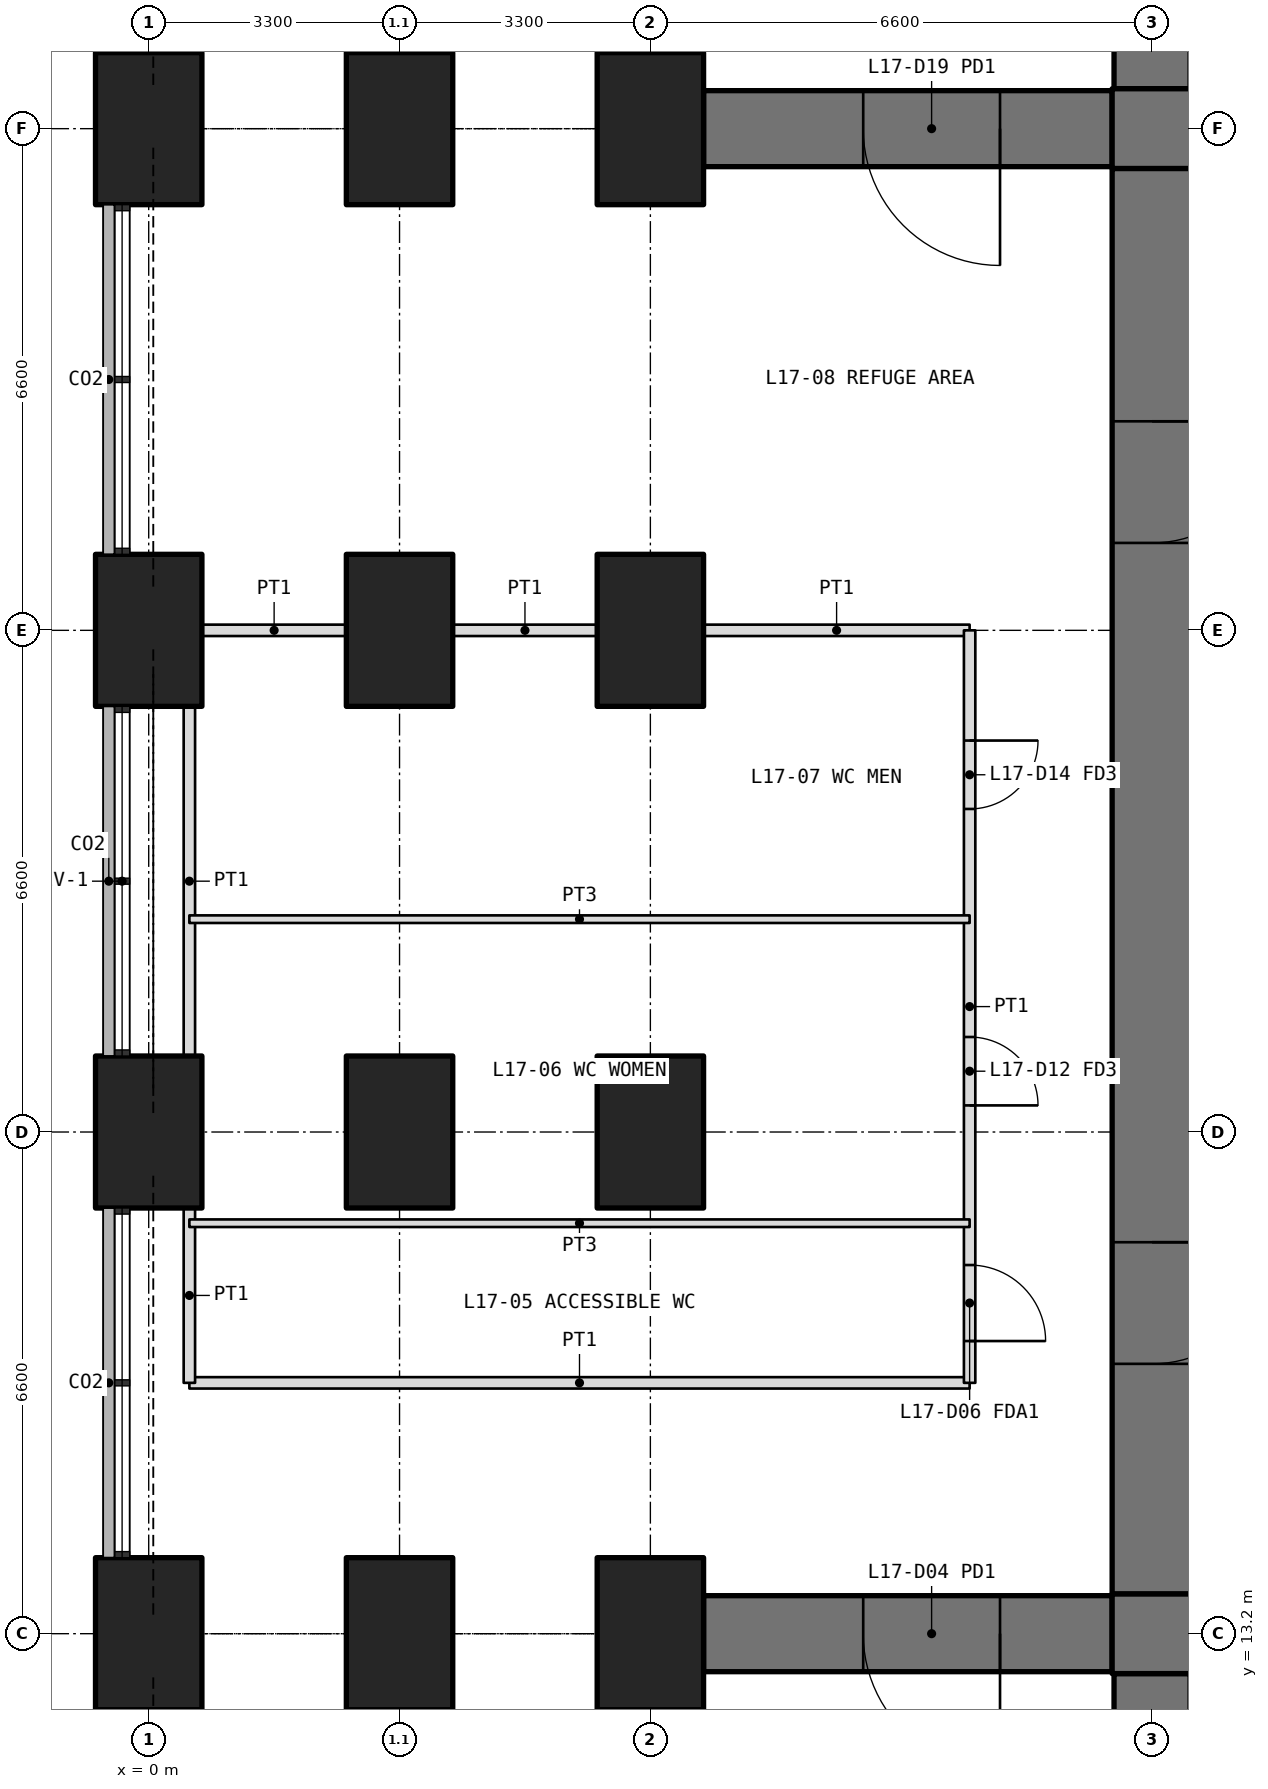
"""IFC4 building model, lengths in metres.
Left out: names, types, materials, properties, quantities, classifications, styles, units other than length and angle.
Written with IfcOpenShell. Run it as: python <this file> out.ifc"""

import sys

from ifc_helpers import new_model, si_unit, direction, frame, frame_2d, origin, origin_2d, place, context, subcontext, project, spatial, rectangle, extrude, element, fill, save


model = new_model("IFC4")
c1 = context("Model", 3, precision=1e-05, world=origin(), true_north=direction((0.0, 1.0)))
c2 = subcontext(c1, "Body", "Model", "MODEL_VIEW")
j1 = project(units=[si_unit("LENGTHUNIT", "METRE"), si_unit("PLANEANGLEUNIT", "RADIAN")], contexts=[c1])
p1 = place(None, origin())
s1 = spatial("IfcSite", under=j1, at=p1, CompositionType="ELEMENT")
p2 = place(p1, origin())
s2 = spatial("IfcBuilding", under=s1, at=p2, CompositionType="ELEMENT")
p3 = place(p2, frame((0.0, 0.0, 75.9)))
s3 = spatial("IfcBuildingStorey", under=s2, at=p3, CompositionType="ELEMENT", Elevation=75.9)
for number, where, z_axis, x_axis in (
    (1, (0.0, 13.2, 0.0), (0.0, 0.0, 1.0), (0.0, 1.0, 0.0)),
    (2, (0.0, 19.8, 0.0), (0.0, 0.0, 1.0), (0.0, 1.0, 0.0)),
    (3, (0.0, 26.4, 0.0), (0.0, 0.0, 1.0), (0.0, 1.0, 0.0)),
    (4, (0.0, 33.0, 0.0), (0.0, 0.0, 1.0), (0.0, 1.0, 0.0)),
    (5, (3.3, 13.2, 0.0), (0.0, 0.0, 1.0), (0.0, 1.0, 0.0)),
    (6, (3.3, 19.8, 0.0), (0.0, 0.0, 1.0), (0.0, 1.0, 0.0)),
    (7, (3.3, 26.4, 0.0), (0.0, 0.0, 1.0), (0.0, 1.0, 0.0)),
    (8, (3.3, 33.0, 0.0), (0.0, 0.0, 1.0), (0.0, 1.0, 0.0)),
    (9, (6.6, 13.2, 0.0), (0.0, 0.0, 1.0), (0.0, 1.0, 0.0)),
    (10, (6.6, 19.8, 0.0), (0.0, 0.0, 1.0), (0.0, 1.0, 0.0)),
    (11, (6.6, 26.4, 0.0), (0.0, 0.0, 1.0), (0.0, 1.0, 0.0)),
    (12, (6.6, 33.0, 0.0), (0.0, 0.0, 1.0), (0.0, 1.0, 0.0)),
):
    element("IfcColumn", number, at=place(p3, frame(where, z_axis=z_axis, x_axis=x_axis)), inside=s3, PredefinedType="COLUMN", context=c2, shape_type="SweptSolid", body=[
        extrude(rectangle(XDim=2.0, YDim=1.4, at=origin_2d()), origin(), (0.0, 0.0, 1.0), 6.3),
    ])
p4 = place(p3, frame((13.2, 12.675, 0.0), z_axis=(0.0, 0.0, 1.0), x_axis=(0.0, -1.0, 0.0)))
e13 = element("IfcWall", 13, at=p4, inside=s3, PredefinedType="SHEAR", context=c2, shape_type="SweptSolid", body=[
    extrude(rectangle(XDim=8.675, YDim=1.0, at=frame_2d((4.337, 0.0))), origin(), (0.0, 0.0, 1.0), 6.0),
])
p5 = place(p4, frame((1.475, 0.0, 0.0)))
e14 = element("IfcOpeningElement", 14, at=p5, cuts=e13, PredefinedType="OPENING", context=c2, shape_type="SweptSolid", body=[
    extrude(rectangle(XDim=1.8, YDim=2.4, at=frame_2d((0.9, 1.2))), frame((0.0, 0.51, 0.0), z_axis=(0.0, -1.0, 0.0), x_axis=(1.0, 0.0, 0.0)), (0.0, 0.0, 1.0), 1.02),
])
p6 = place(p3, frame((13.2, 33.525, 0.0), z_axis=(0.0, 0.0, 1.0), x_axis=(0.0, 1.0, 0.0)))
e15 = element("IfcWall", 15, at=p6, inside=s3, PredefinedType="SHEAR", context=c2, shape_type="SweptSolid", body=[
    extrude(rectangle(XDim=8.675, YDim=1.0, at=frame_2d((4.337, 0.0))), origin(), (0.0, 0.0, 1.0), 6.0),
])
p7 = place(p6, frame((1.475, 0.0, 0.0)))
e16 = element("IfcOpeningElement", 16, at=p7, cuts=e15, PredefinedType="OPENING", context=c2, shape_type="SweptSolid", body=[
    extrude(rectangle(XDim=1.8, YDim=2.4, at=frame_2d((0.9, 1.2))), frame((0.0, 0.51, 0.0), z_axis=(0.0, -1.0, 0.0), x_axis=(1.0, 0.0, 0.0)), (0.0, 0.0, 1.0), 1.02),
])
p8 = place(p3, frame((12.675, 13.2, 0.0), z_axis=(0.0, 0.0, 1.0), x_axis=(-1.0, 0.0, 0.0)))
e17 = element("IfcWall", 17, at=p8, inside=s3, PredefinedType="SHEAR", context=c2, shape_type="SweptSolid", body=[
    extrude(rectangle(XDim=5.375, YDim=1.0, at=frame_2d((2.688, 0.0))), origin(), (0.0, 0.0, 1.0), 6.0),
])
p9 = place(p8, frame((1.475, 0.0, 0.0)))
e18 = element("IfcOpeningElement", 18, at=p9, cuts=e17, PredefinedType="OPENING", context=c2, shape_type="SweptSolid", body=[
    extrude(rectangle(XDim=1.8, YDim=2.4, at=frame_2d((0.9, 1.2))), frame((0.0, 0.51, 0.0), z_axis=(0.0, -1.0, 0.0), x_axis=(1.0, 0.0, 0.0)), (0.0, 0.0, 1.0), 1.02),
])
p10 = place(p3, frame((12.675, 33.0, 0.0), z_axis=(0.0, 0.0, 1.0), x_axis=(-1.0, 0.0, 0.0)))
e19 = element("IfcWall", 19, at=p10, inside=s3, PredefinedType="SHEAR", context=c2, shape_type="SweptSolid", body=[
    extrude(rectangle(XDim=5.375, YDim=1.0, at=frame_2d((2.688, 0.0))), origin(), (0.0, 0.0, 1.0), 6.0),
])
p11 = place(p10, frame((1.475, 0.0, 0.0)))
e20 = element("IfcOpeningElement", 20, at=p11, cuts=e19, PredefinedType="OPENING", context=c2, shape_type="SweptSolid", body=[
    extrude(rectangle(XDim=1.8, YDim=2.4, at=frame_2d((0.9, 1.2))), frame((0.0, 0.51, 0.0), z_axis=(0.0, -1.0, 0.0), x_axis=(1.0, 0.0, 0.0)), (0.0, 0.0, 1.0), 1.02),
])
for number, where, z_axis, x_axis in (
    (21, (12.675, 13.2, 0.0), (0.0, 0.0, 1.0), (1.0, 0.0, 0.0)),
    (22, (40.125, 33.0, 0.0), (0.0, 0.0, 1.0), (-1.0, 0.0, 0.0)),
):
    element("IfcWall", number, at=place(p3, frame(where, z_axis=z_axis, x_axis=x_axis)), inside=s3, PredefinedType="SHEAR", context=c2, shape_type="SweptSolid", body=[
        extrude(rectangle(XDim=27.45, YDim=1.05, at=frame_2d((13.725, 0.0))), origin(), (0.0, 0.0, 1.0), 6.3),
    ])
p12 = place(p3, frame((13.2, 32.475, 0.0), z_axis=(0.0, 0.0, 1.0), x_axis=(0.0, -1.0, 0.0)))
e23 = element("IfcWall", 23, at=p12, inside=s3, PredefinedType="SHEAR", context=c2, shape_type="SweptSolid", body=[
    extrude(rectangle(XDim=18.75, YDim=1.05, at=frame_2d((9.375, 0.0))), origin(), (0.0, 0.0, 1.0), 6.3),
])
p13 = place(p12, frame((14.125, 0.0, 0.0)))
e24 = element("IfcOpeningElement", 24, at=p13, cuts=e23, PredefinedType="OPENING", context=c2, shape_type="SweptSolid", body=[
    extrude(rectangle(XDim=1.6, YDim=2.1, at=frame_2d((0.8, 1.05))), frame((0.0, 0.535, 0.0), z_axis=(0.0, -1.0, 0.0), x_axis=(1.0, 0.0, 0.0)), (0.0, 0.0, 1.0), 1.07),
])
p14 = place(p12, frame((3.325, 0.0, 0.0)))
e25 = element("IfcOpeningElement", 25, at=p14, cuts=e23, PredefinedType="OPENING", context=c2, shape_type="SweptSolid", body=[
    extrude(rectangle(XDim=1.6, YDim=2.1, at=frame_2d((0.8, 1.05))), frame((0.0, 0.535, 0.0), z_axis=(0.0, -1.0, 0.0), x_axis=(1.0, 0.0, 0.0)), (0.0, 0.0, 1.0), 1.07),
])
p15 = place(p3, frame((10.8, 16.5, 0.0), z_axis=(0.0, 0.0, 1.0), x_axis=(-1.0, 0.0, 0.0)))
e26 = element("IfcWall", 26, at=p15, inside=s3, PredefinedType="PARTITIONING", context=c2, shape_type="SweptSolid", body=[
    extrude(rectangle(XDim=10.265, YDim=0.15, at=frame_2d((5.133, 0.0))), origin(), (0.0, 0.0, 1.0), 4.0),
])
p16 = place(p3, frame((0.7, 26.4, 0.0), z_axis=(0.0, 0.0, 1.0), x_axis=(1.0, 0.0, 0.0)))
e27 = element("IfcWall", 27, at=p16, inside=s3, PredefinedType="PARTITIONING", context=c2, shape_type="SweptSolid", body=[
    extrude(rectangle(XDim=1.9, YDim=0.15, at=frame_2d((0.95, 0.0))), origin(), (0.0, 0.0, 1.0), 4.0),
])
p17 = place(p3, frame((4.0, 26.4, 0.0), z_axis=(0.0, 0.0, 1.0), x_axis=(1.0, 0.0, 0.0)))
e28 = element("IfcWall", 28, at=p17, inside=s3, PredefinedType="PARTITIONING", context=c2, shape_type="SweptSolid", body=[
    extrude(rectangle(XDim=1.9, YDim=0.15, at=frame_2d((0.95, 0.0))), origin(), (0.0, 0.0, 1.0), 4.0),
])
p18 = place(p3, frame((7.3, 26.4, 0.0), z_axis=(0.0, 0.0, 1.0), x_axis=(1.0, 0.0, 0.0)))
e29 = element("IfcWall", 29, at=p18, inside=s3, PredefinedType="PARTITIONING", context=c2, shape_type="SweptSolid", body=[
    extrude(rectangle(XDim=3.5, YDim=0.15, at=frame_2d((1.75, 0.0))), origin(), (0.0, 0.0, 1.0), 4.0),
])
p19 = place(p3, frame((0.535, 16.5, 0.0), z_axis=(0.0, 0.0, 1.0), x_axis=(0.0, 1.0, 0.0)))
e30 = element("IfcWall", 30, at=p19, inside=s3, PredefinedType="PARTITIONING", context=c2, shape_type="SweptSolid", body=[
    extrude(rectangle(XDim=2.3, YDim=0.15, at=frame_2d((1.15, 0.0))), origin(), (0.0, 0.0, 1.0), 4.0),
])
p20 = place(p3, frame((0.535, 20.8, 0.0), z_axis=(0.0, 0.0, 1.0), x_axis=(0.0, 1.0, 0.0)))
e31 = element("IfcWall", 31, at=p20, inside=s3, PredefinedType="PARTITIONING", context=c2, shape_type="SweptSolid", body=[
    extrude(rectangle(XDim=4.6, YDim=0.15, at=frame_2d((2.3, 0.0))), origin(), (0.0, 0.0, 1.0), 4.0),
])
p21 = place(p3, frame((10.8, 26.4, 0.0), z_axis=(0.0, 0.0, 1.0), x_axis=(0.0, -1.0, 0.0)))
e32 = element("IfcWall", 32, at=p21, inside=s3, PredefinedType="PARTITIONING", context=c2, shape_type="SweptSolid", body=[
    extrude(rectangle(XDim=9.9, YDim=0.15, at=frame_2d((4.95, 0.0))), origin(), (0.0, 0.0, 1.0), 4.0),
])
p22 = place(p21, frame((8.35, 0.0, 0.0)))
e33 = element("IfcOpeningElement", 33, at=p22, cuts=e32, PredefinedType="OPENING", context=c2, shape_type="SweptSolid", body=[
    extrude(rectangle(XDim=1.0, YDim=2.1, at=frame_2d((0.5, 1.05))), frame((0.0, 0.085, 0.0), z_axis=(0.0, -1.0, 0.0), x_axis=(1.0, 0.0, 0.0)), (0.0, 0.0, 1.0), 0.17),
])
p23 = place(p21, frame((5.35, 0.0, 0.0)))
e34 = element("IfcOpeningElement", 34, at=p23, cuts=e32, PredefinedType="OPENING", context=c2, shape_type="SweptSolid", body=[
    extrude(rectangle(XDim=0.9, YDim=2.1, at=frame_2d((0.45, 1.05))), frame((0.0, 0.085, 0.0), z_axis=(0.0, -1.0, 0.0), x_axis=(1.0, 0.0, 0.0)), (0.0, 0.0, 1.0), 0.17),
])
p24 = place(p21, frame((1.45, 0.0, 0.0)))
e35 = element("IfcOpeningElement", 35, at=p24, cuts=e32, PredefinedType="OPENING", context=c2, shape_type="SweptSolid", body=[
    extrude(rectangle(XDim=0.9, YDim=2.1, at=frame_2d((0.45, 1.05))), frame((0.0, 0.085, 0.0), z_axis=(0.0, -1.0, 0.0), x_axis=(1.0, 0.0, 0.0)), (0.0, 0.0, 1.0), 0.17),
])
for number, where, z_axis, x_axis in (
    (36, (0.535, 18.6, 0.0), (0.0, 0.0, 1.0), (1.0, 0.0, 0.0)),
    (37, (0.535, 22.6, 0.0), (0.0, 0.0, 1.0), (1.0, 0.0, 0.0)),
):
    element("IfcWall", number, at=place(p3, frame(where, z_axis=z_axis, x_axis=x_axis)), inside=s3, PredefinedType="PARTITIONING", context=c2, shape_type="SweptSolid", body=[
        extrude(rectangle(XDim=10.265, YDim=0.1, at=frame_2d((5.133, 0.0))), origin(), (0.0, 0.0, 1.0), 4.0),
    ])
p25 = place(p22, origin())
e38 = element("IfcDoor", 38, at=p25, inside=s3, OperationType="SINGLE_SWING_RIGHT", PredefinedType="DOOR", context=c2, shape_type="SweptSolid", body=[
    extrude(rectangle(XDim=1.0, YDim=2.1, at=frame_2d((0.5, 1.05))), frame((0.0, 0.025, 0.0), z_axis=(0.0, -1.0, 0.0), x_axis=(1.0, 0.0, 0.0)), (0.0, 0.0, 1.0), 0.05),
])
fill(e33, e38)
p26 = place(p23, origin())
e39 = element("IfcDoor", 39, at=p26, inside=s3, OperationType="SINGLE_SWING_RIGHT", PredefinedType="DOOR", context=c2, shape_type="SweptSolid", body=[
    extrude(rectangle(XDim=0.9, YDim=2.1, at=frame_2d((0.45, 1.05))), frame((0.0, 0.025, 0.0), z_axis=(0.0, -1.0, 0.0), x_axis=(1.0, 0.0, 0.0)), (0.0, 0.0, 1.0), 0.05),
])
fill(e34, e39)
p27 = place(p24, origin())
e40 = element("IfcDoor", 40, at=p27, inside=s3, OperationType="SINGLE_SWING_LEFT", PredefinedType="DOOR", context=c2, shape_type="SweptSolid", body=[
    extrude(rectangle(XDim=0.9, YDim=2.1, at=frame_2d((0.45, 1.05))), frame((0.0, 0.025, 0.0), z_axis=(0.0, -1.0, 0.0), x_axis=(1.0, 0.0, 0.0)), (0.0, 0.0, 1.0), 0.05),
])
fill(e35, e40)
p28 = place(p9, origin())
e41 = element("IfcDoor", 41, at=p28, inside=s3, OperationType="DOUBLE_DOOR_SINGLE_SWING", PredefinedType="DOOR", context=c2, shape_type="SweptSolid", body=[
    extrude(rectangle(XDim=1.8, YDim=2.4, at=frame_2d((0.9, 1.2))), frame((0.0, 0.025, 0.0), z_axis=(0.0, -1.0, 0.0), x_axis=(1.0, 0.0, 0.0)), (0.0, 0.0, 1.0), 0.05),
])
fill(e18, e41)
p29 = place(p11, origin())
e42 = element("IfcDoor", 42, at=p29, inside=s3, OperationType="DOUBLE_DOOR_SINGLE_SWING", PredefinedType="DOOR", context=c2, shape_type="SweptSolid", body=[
    extrude(rectangle(XDim=1.8, YDim=2.4, at=frame_2d((0.9, 1.2))), frame((0.0, 0.025, 0.0), z_axis=(0.0, -1.0, 0.0), x_axis=(1.0, 0.0, 0.0)), (0.0, 0.0, 1.0), 0.05),
])
fill(e20, e42)
p30 = place(p13, origin())
e43 = element("IfcDoor", 43, at=p30, inside=s3, OperationType="DOUBLE_DOOR_DOUBLE_SWING", PredefinedType="DOOR", context=c2, shape_type="SweptSolid", body=[
    extrude(rectangle(XDim=1.6, YDim=2.1, at=frame_2d((0.8, 1.05))), frame((0.0, 0.025, 0.0), z_axis=(0.0, -1.0, 0.0), x_axis=(1.0, 0.0, 0.0)), (0.0, 0.0, 1.0), 0.05),
])
fill(e24, e43)
p31 = place(p14, origin())
e44 = element("IfcDoor", 44, at=p31, inside=s3, OperationType="DOUBLE_DOOR_DOUBLE_SWING", PredefinedType="DOOR", context=c2, shape_type="SweptSolid", body=[
    extrude(rectangle(XDim=1.6, YDim=2.1, at=frame_2d((0.8, 1.05))), frame((0.0, 0.025, 0.0), z_axis=(0.0, -1.0, 0.0), x_axis=(1.0, 0.0, 0.0)), (0.0, 0.0, 1.0), 0.05),
])
fill(e25, e44)
save(model, sys.argv[1])
